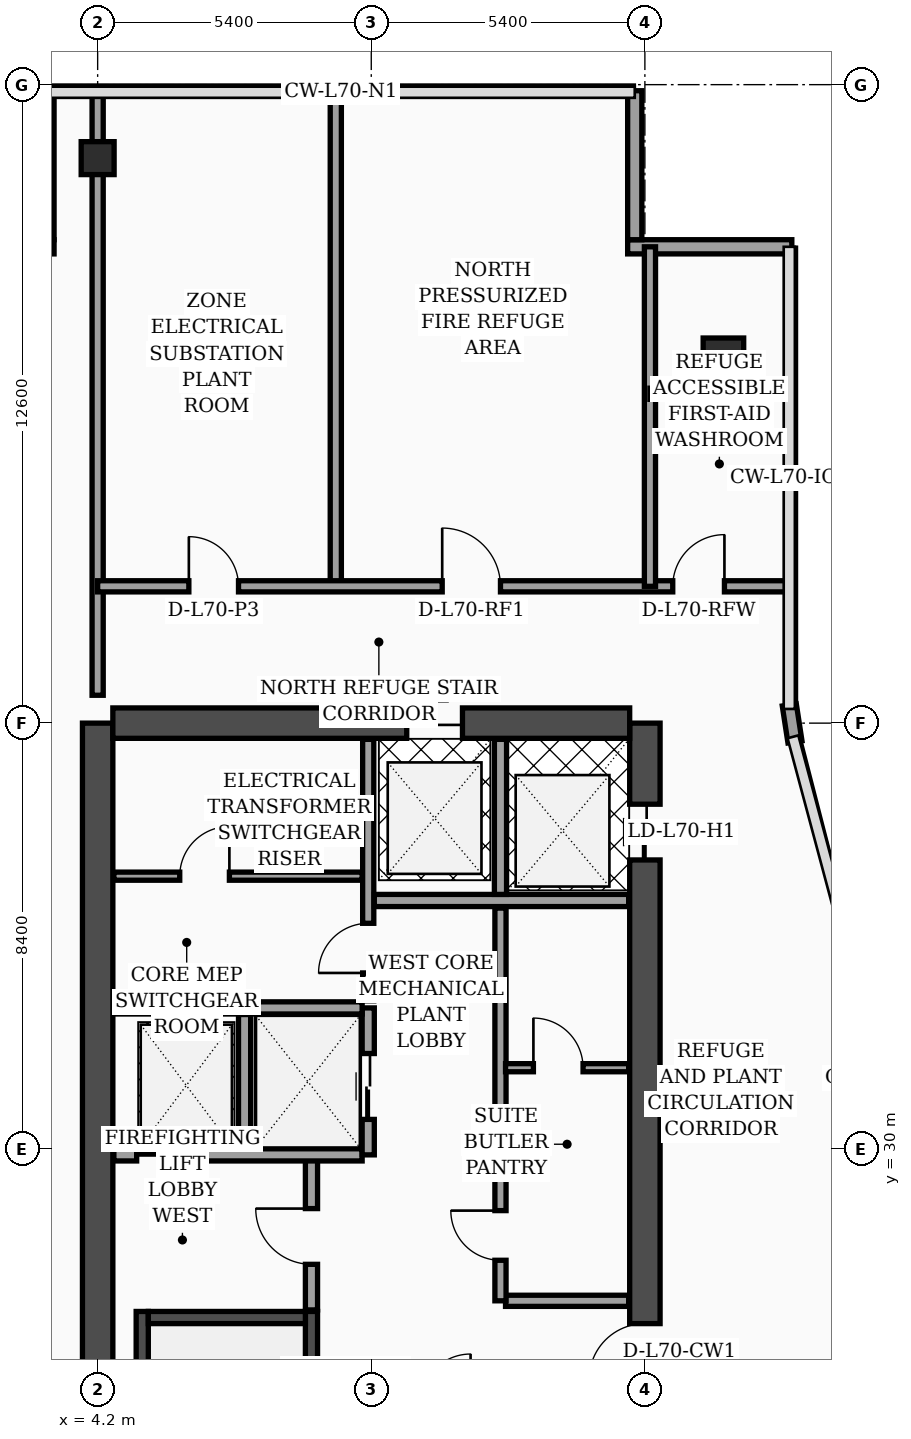
"""IFC4 building model, lengths in metres.
Left out: names, types, materials, properties, quantities, classifications, styles, units other than length and angle.
Written with IfcOpenShell. Run it as: python <this file> out.ifc"""

import sys

from ifc_helpers import new_model, si_unit, direction, frame, frame_2d, origin, origin_2d, place, context, subcontext, project, spatial, rectangle, hollow_rectangle, extrude, element, fill, save


model = new_model("IFC4")
c1 = context("Model", 3, precision=1e-05, world=origin(), true_north=direction((0.0, 1.0)))
c2 = subcontext(c1, "Body", "Model", "MODEL_VIEW")
j1 = project(units=[si_unit("LENGTHUNIT", "METRE"), si_unit("PLANEANGLEUNIT", "RADIAN")], contexts=[c1])
p1 = place(None, origin())
s1 = spatial("IfcSite", under=j1, at=p1, CompositionType="ELEMENT")
p2 = place(p1, origin())
s2 = spatial("IfcBuilding", under=s1, at=p2, CompositionType="ELEMENT")
p3 = place(p2, frame((0.0, 0.0, 282.5)))
s3 = spatial("IfcBuildingStorey", under=s2, at=p3, CompositionType="ELEMENT", Elevation=282.5)
p4 = place(p3, frame((4.2, 16.8, 0.0), z_axis=(0.0, 0.0, 1.0), x_axis=(0.0, 1.0, 0.0)))
e1 = element("IfcWall", 1, at=p4, inside=s3, PredefinedType="SHEAR", context=c2, shape_type="SweptSolid", body=[
    extrude(rectangle(XDim=21.6, YDim=0.6, at=frame_2d((10.8, 0.0))), origin(), (0.0, 0.0, 1.0), 4.35),
])
p5 = place(p3, frame((15.0, 16.8, 0.0), z_axis=(0.0, 0.0, 1.0), x_axis=(0.0, 1.0, 0.0)))
e2 = element("IfcWall", 2, at=p5, inside=s3, PredefinedType="SHEAR", context=c2, shape_type="SweptSolid", body=[
    extrude(rectangle(XDim=21.6, YDim=0.6, at=frame_2d((10.8, 0.0))), origin(), (0.0, 0.0, 1.0), 4.35),
])
p6 = place(p5, frame((8.65, 0.0, 0.0)))
e3 = element("IfcOpeningElement", 3, at=p6, cuts=e2, PredefinedType="OPENING", context=c2, shape_type="SweptSolid", body=[
    extrude(rectangle(XDim=1.1, YDim=2.2, at=frame_2d((0.55, 1.1))), frame((0.0, 0.31, 0.0), z_axis=(0.0, -1.0, 0.0), x_axis=(1.0, 0.0, 0.0)), (0.0, 0.0, 1.0), 0.62),
])
p7 = place(p5, frame((18.9, 0.0, 0.0)))
e4 = element("IfcOpeningElement", 4, at=p7, cuts=e2, PredefinedType="OPENING", context=c2, shape_type="SweptSolid", body=[
    extrude(rectangle(XDim=1.1, YDim=2.2, at=frame_2d((0.55, 1.1))), frame((0.0, 0.31, 0.0), z_axis=(0.0, -1.0, 0.0), x_axis=(1.0, 0.0, 0.0)), (0.0, 0.0, 1.0), 0.62),
])
p8 = place(p3, frame((4.5, 38.4, 0.0), z_axis=(0.0, 0.0, 1.0), x_axis=(1.0, 0.0, 0.0)))
e5 = element("IfcWall", 5, at=p8, inside=s3, PredefinedType="SHEAR", context=c2, shape_type="SweptSolid", body=[
    extrude(rectangle(XDim=10.2, YDim=0.6, at=frame_2d((5.1, 0.0))), origin(), (0.0, 0.0, 1.0), 4.35),
])
p9 = place(p8, frame((5.8, 0.0, 0.0)))
e6 = element("IfcOpeningElement", 6, at=p9, cuts=e5, PredefinedType="OPENING", context=c2, shape_type="SweptSolid", body=[
    extrude(rectangle(XDim=1.1, YDim=2.2, at=frame_2d((0.55, 1.1))), frame((0.0, 0.31, 0.0), z_axis=(0.0, -1.0, 0.0), x_axis=(1.0, 0.0, 0.0)), (0.0, 0.0, 1.0), 0.62),
])
p10 = place(p3, frame((5.08, 17.1, 0.0), z_axis=(0.0, 0.0, 1.0), x_axis=(0.0, 1.0, 0.0)))
e7 = element("IfcWall", 7, at=p10, inside=s3, PredefinedType="SOLIDWALL", context=c2, shape_type="SweptSolid", body=[
    extrude(rectangle(XDim=9.69, YDim=0.24, at=frame_2d((4.845, 0.0))), origin(), (0.0, 0.0, 1.0), 4.35),
])
p11 = place(p3, frame((8.42, 17.1, 0.0), z_axis=(0.0, 0.0, 1.0), x_axis=(0.0, 1.0, 0.0)))
e8 = element("IfcWall", 8, at=p11, inside=s3, PredefinedType="SOLIDWALL", context=c2, shape_type="SweptSolid", body=[
    extrude(rectangle(XDim=9.69, YDim=0.24, at=frame_2d((4.845, 0.0))), origin(), (0.0, 0.0, 1.0), 4.35),
])
p12 = place(p11, frame((0.35, 0.0, 0.0)))
e9 = element("IfcOpeningElement", 9, at=p12, cuts=e8, PredefinedType="OPENING", context=c2, shape_type="SweptSolid", body=[
    extrude(rectangle(XDim=1.15, YDim=2.2, at=frame_2d((0.575, 1.1))), frame((0.0, 0.13, 0.0), z_axis=(0.0, -1.0, 0.0), x_axis=(1.0, 0.0, 0.0)), (0.0, 0.0, 1.0), 0.26),
])
p13 = place(p3, frame((5.2, 26.67, 0.0), z_axis=(0.0, 0.0, 1.0), x_axis=(1.0, 0.0, 0.0)))
e10 = element("IfcWall", 10, at=p13, inside=s3, PredefinedType="SOLIDWALL", context=c2, shape_type="SweptSolid", body=[
    extrude(rectangle(XDim=3.1, YDim=0.24, at=frame_2d((1.55, 0.0))), origin(), (0.0, 0.0, 1.0), 4.35),
])
p14 = place(p3, frame((4.2, 49.55, 0.0), z_axis=(0.0, 0.0, 1.0), x_axis=(1.0, 0.0, 0.0)))
e11 = element("IfcColumn", 11, at=p14, inside=s3, PredefinedType="COLUMN", context=c2, shape_type="SweptSolid", body=[
    extrude(hollow_rectangle(XDim=0.65, YDim=0.65, WallThickness=0.028, at=origin_2d()), origin(), (0.0, 0.0, 1.0), 4.35),
])
p15 = place(p3, frame((16.55, 45.6, 0.0), z_axis=(0.0, 0.0, 1.0), x_axis=(1.0, 0.0, 0.0)))
e12 = element("IfcColumn", 12, at=p15, inside=s3, PredefinedType="COLUMN", context=c2, shape_type="SweptSolid", body=[
    extrude(rectangle(XDim=0.8, YDim=0.8, at=origin_2d()), origin(), (0.0, 0.0, 1.0), 4.35),
])
p16 = place(p3, frame((17.962, 38.03, 0.0), z_axis=(0.0, 0.0, 1.0), x_axis=(-0.15141125477, 0.988470855377, 0.0)))
e13 = element("IfcWall", 13, at=p16, inside=s3, PredefinedType="SOLIDWALL", context=c2, shape_type="SweptSolid", body=[
    extrude(rectangle(XDim=0.739, YDim=0.28, at=frame_2d((0.369, 0.0))), origin(), (0.0, 0.0, 1.0), 4.35),
])
p17 = place(p3, frame((17.9, 47.8, 0.0), z_axis=(0.0, 0.0, 1.0), x_axis=(-1.0, 0.0, 0.0)))
e14 = element("IfcWall", 14, at=p17, inside=s3, PredefinedType="SOLIDWALL", context=c2, shape_type="SweptSolid", body=[
    extrude(rectangle(XDim=3.24, YDim=0.28, at=frame_2d((1.62, 0.0))), origin(), (0.0, 0.0, 1.0), 4.35),
])
p18 = place(p3, frame((14.8, 47.94, 0.0), z_axis=(0.0, 0.0, 1.0), x_axis=(0.0, 1.0, 0.0)))
e15 = element("IfcWall", 15, at=p18, inside=s3, PredefinedType="SOLIDWALL", context=c2, shape_type="SweptSolid", body=[
    extrude(rectangle(XDim=2.94, YDim=0.28, at=frame_2d((1.47, 0.0))), origin(), (0.0, 0.0, 1.0), 4.35),
])
p19 = place(p3, frame((3.2, 50.88, 0.0), z_axis=(0.0, 0.0, 1.0), x_axis=(0.0, -1.0, 0.0)))
e16 = element("IfcWall", 16, at=p19, inside=s3, PredefinedType="SOLIDWALL", context=c2, shape_type="SweptSolid", body=[
    extrude(rectangle(XDim=2.94, YDim=0.28, at=frame_2d((1.47, 0.0))), origin(), (0.0, 0.0, 1.0), 3.9),
])
p20 = place(p3, frame((3.34, 47.8, 0.0), z_axis=(0.0, 0.0, 1.0), x_axis=(-1.0, 0.0, 0.0)))
e17 = element("IfcWall", 17, at=p20, inside=s3, PredefinedType="SOLIDWALL", context=c2, shape_type="SweptSolid", body=[
    extrude(rectangle(XDim=3.22, YDim=0.28, at=frame_2d((1.61, 0.0))), origin(), (0.0, 0.0, 1.0), 3.9),
])
p21 = place(p3, frame((8.42, 26.82, 0.0), z_axis=(0.0, 0.0, 1.0), x_axis=(0.0, 1.0, 0.0)))
e18 = element("IfcWall", 18, at=p21, inside=s3, PredefinedType="SOLIDWALL", context=c2, shape_type="SweptSolid", body=[
    extrude(rectangle(XDim=3.0, YDim=0.24, at=frame_2d((1.5, 0.0))), origin(), (0.0, 0.0, 1.0), 4.35),
])
p22 = place(p21, frame((0.9, 0.0, 0.0)))
e19 = element("IfcOpeningElement", 19, at=p22, cuts=e18, PredefinedType="OPENING", context=c2, shape_type="SweptSolid", body=[
    extrude(rectangle(XDim=1.1, YDim=2.2, at=frame_2d((0.55, 1.1))), frame((0.0, 0.13, 0.0), z_axis=(0.0, -1.0, 0.0), x_axis=(1.0, 0.0, 0.0)), (0.0, 0.0, 1.0), 0.26),
])
p23 = place(p3, frame((4.52, 29.88, 0.0), z_axis=(0.0, 0.0, 1.0), x_axis=(1.0, 0.0, 0.0)))
e20 = element("IfcWall", 20, at=p23, inside=s3, PredefinedType="SOLIDWALL", context=c2, shape_type="SweptSolid", body=[
    extrude(rectangle(XDim=4.9, YDim=0.24, at=frame_2d((2.45, 0.0))), origin(), (0.0, 0.0, 1.0), 4.35),
])
p24 = place(p23, frame((0.45, 0.0, 0.0)))
e21 = element("IfcOpeningElement", 21, at=p24, cuts=e20, PredefinedType="OPENING", context=c2, shape_type="SweptSolid", body=[
    extrude(rectangle(XDim=1.3, YDim=2.35, at=frame_2d((0.65, 1.175))), frame((0.0, 0.13, 0.0), z_axis=(0.0, -1.0, 0.0), x_axis=(1.0, 0.0, 0.0)), (0.0, 0.0, 1.0), 0.26),
])
p25 = place(p3, frame((7.1, 30.02, 0.0), z_axis=(0.0, 0.0, 1.0), x_axis=(0.0, 1.0, 0.0)))
e22 = element("IfcWall", 22, at=p25, inside=s3, PredefinedType="SOLIDWALL", context=c2, shape_type="SweptSolid", body=[
    extrude(rectangle(XDim=2.63, YDim=0.24, at=frame_2d((1.315, 0.0))), origin(), (0.0, 0.0, 1.0), 4.35),
])
p26 = place(p3, frame((9.54, 29.88, 0.0), z_axis=(0.0, 0.0, 1.0), x_axis=(0.0, 1.0, 0.0)))
e23 = element("IfcWall", 23, at=p26, inside=s3, PredefinedType="SOLIDWALL", context=c2, shape_type="SweptSolid", body=[
    extrude(rectangle(XDim=2.9, YDim=0.24, at=frame_2d((1.45, 0.0))), origin(), (0.0, 0.0, 1.0), 4.35),
])
p27 = place(p26, frame((0.7, 0.0, 0.0)))
e24 = element("IfcOpeningElement", 24, at=p27, cuts=e23, PredefinedType="OPENING", context=c2, shape_type="SweptSolid", body=[
    extrude(rectangle(XDim=1.3, YDim=2.35, at=frame_2d((0.65, 1.175))), frame((0.0, 0.13, 0.0), z_axis=(0.0, -1.0, 0.0), x_axis=(1.0, 0.0, 0.0)), (0.0, 0.0, 1.0), 0.26),
])
p28 = place(p3, frame((4.52, 32.78, 0.0), z_axis=(0.0, 0.0, 1.0), x_axis=(1.0, 0.0, 0.0)))
e25 = element("IfcWall", 25, at=p28, inside=s3, PredefinedType="SOLIDWALL", context=c2, shape_type="SweptSolid", body=[
    extrude(rectangle(XDim=4.9, YDim=0.24, at=frame_2d((2.45, 0.0))), origin(), (0.0, 0.0, 1.0), 4.0),
])
p29 = place(p3, frame((4.52, 35.38, 0.0), z_axis=(0.0, 0.0, 1.0), x_axis=(1.0, 0.0, 0.0)))
e26 = element("IfcWall", 26, at=p29, inside=s3, PredefinedType="PARTITIONING", context=c2, shape_type="SweptSolid", body=[
    extrude(rectangle(XDim=4.9, YDim=0.16, at=frame_2d((2.45, 0.0))), origin(), (0.0, 0.0, 1.0), 4.35),
])
p30 = place(p29, frame((1.3, 0.0, 0.0)))
e27 = element("IfcOpeningElement", 27, at=p30, cuts=e26, PredefinedType="OPENING", context=c2, shape_type="SweptSolid", body=[
    extrude(rectangle(XDim=0.98, YDim=2.15, at=frame_2d((0.49, 1.075))), frame((0.0, 0.09, 0.0), z_axis=(0.0, -1.0, 0.0), x_axis=(1.0, 0.0, 0.0)), (0.0, 0.0, 1.0), 0.18),
])
p31 = place(p3, frame((9.54, 32.92, 0.0), z_axis=(0.0, 0.0, 1.0), x_axis=(0.0, 1.0, 0.0)))
e28 = element("IfcWall", 28, at=p31, inside=s3, PredefinedType="SOLIDWALL", context=c2, shape_type="SweptSolid", body=[
    extrude(rectangle(XDim=5.16, YDim=0.22, at=frame_2d((2.58, 0.0))), origin(), (0.0, 0.0, 1.0), 4.35),
])
p32 = place(p31, frame((0.55, 0.0, 0.0)))
e29 = element("IfcOpeningElement", 29, at=p32, cuts=e28, PredefinedType="OPENING", context=c2, shape_type="SweptSolid", body=[
    extrude(rectangle(XDim=0.98, YDim=2.15, at=frame_2d((0.49, 1.075))), frame((0.0, 0.12, 0.0), z_axis=(0.0, -1.0, 0.0), x_axis=(1.0, 0.0, 0.0)), (0.0, 0.0, 1.0), 0.24),
])
p33 = place(p3, frame((12.25, 27.0, 0.0), z_axis=(0.0, 0.0, 1.0), x_axis=(1.0, 0.0, 0.0)))
e30 = element("IfcWall", 30, at=p33, inside=s3, PredefinedType="SOLIDWALL", context=c2, shape_type="SweptSolid", body=[
    extrude(rectangle(XDim=2.43, YDim=0.22, at=frame_2d((1.215, 0.0))), origin(), (0.0, 0.0, 1.0), 4.35),
])
p34 = place(p3, frame((12.15, 27.0, 0.0), z_axis=(0.0, 0.0, 1.0), x_axis=(0.0, 1.0, 0.0)))
e31 = element("IfcWall", 31, at=p34, inside=s3, PredefinedType="SOLIDWALL", context=c2, shape_type="SweptSolid", body=[
    extrude(rectangle(XDim=7.75, YDim=0.22, at=frame_2d((3.875, 0.0))), origin(), (0.0, 0.0, 1.0), 4.35),
])
p35 = place(p34, frame((0.8, 0.0, 0.0)))
e32 = element("IfcOpeningElement", 32, at=p35, cuts=e31, PredefinedType="OPENING", context=c2, shape_type="SweptSolid", body=[
    extrude(rectangle(XDim=0.98, YDim=2.15, at=frame_2d((0.49, 1.075))), frame((0.0, 0.12, 0.0), z_axis=(0.0, -1.0, 0.0), x_axis=(1.0, 0.0, 0.0)), (0.0, 0.0, 1.0), 0.24),
])
p36 = place(p3, frame((12.25, 31.6, 0.0), z_axis=(0.0, 0.0, 1.0), x_axis=(1.0, 0.0, 0.0)))
e33 = element("IfcWall", 33, at=p36, inside=s3, PredefinedType="PARTITIONING", context=c2, shape_type="SweptSolid", body=[
    extrude(rectangle(XDim=2.43, YDim=0.16, at=frame_2d((1.215, 0.0))), origin(), (0.0, 0.0, 1.0), 3.95),
])
p37 = place(p36, frame((0.55, 0.0, 0.0)))
e34 = element("IfcOpeningElement", 34, at=p37, cuts=e33, PredefinedType="OPENING", context=c2, shape_type="SweptSolid", body=[
    extrude(rectangle(XDim=0.98, YDim=2.15, at=frame_2d((0.49, 1.075))), frame((0.0, 0.09, 0.0), z_axis=(0.0, -1.0, 0.0), x_axis=(1.0, 0.0, 0.0)), (0.0, 0.0, 1.0), 0.18),
])
p38 = place(p3, frame((9.66, 34.9, 0.0), z_axis=(0.0, 0.0, 1.0), x_axis=(1.0, 0.0, 0.0)))
e35 = element("IfcWall", 35, at=p38, inside=s3, PredefinedType="SOLIDWALL", context=c2, shape_type="SweptSolid", body=[
    extrude(rectangle(XDim=5.02, YDim=0.24, at=frame_2d((2.51, 0.0))), origin(), (0.0, 0.0, 1.0), 4.35),
])
p39 = place(p3, frame((12.15, 35.02, 0.0), z_axis=(0.0, 0.0, 1.0), x_axis=(0.0, 1.0, 0.0)))
e36 = element("IfcWall", 36, at=p39, inside=s3, PredefinedType="SOLIDWALL", context=c2, shape_type="SweptSolid", body=[
    extrude(rectangle(XDim=3.06, YDim=0.24, at=frame_2d((1.53, 0.0))), origin(), (0.0, 0.0, 1.0), 4.35),
])
p40 = place(p3, frame((4.2, 38.95, 0.0), z_axis=(0.0, 0.0, 1.0), x_axis=(0.0, 1.0, 0.0)))
e37 = element("IfcWall", 37, at=p40, inside=s3, PredefinedType="SOLIDWALL", context=c2, shape_type="SweptSolid", body=[
    extrude(rectangle(XDim=11.99, YDim=0.22, at=frame_2d((5.995, 0.0))), origin(), (0.0, 0.0, 1.0), 3.8),
])
p41 = place(p3, frame((8.9, 41.1, 0.0), z_axis=(0.0, 0.0, 1.0), x_axis=(0.0, 1.0, 0.0)))
e38 = element("IfcWall", 38, at=p41, inside=s3, PredefinedType="SOLIDWALL", context=c2, shape_type="SweptSolid", body=[
    extrude(rectangle(XDim=9.84, YDim=0.22, at=frame_2d((4.92, 0.0))), origin(), (0.0, 0.0, 1.0), 3.9),
])
p42 = place(p3, frame((4.2, 41.1, 0.0), z_axis=(0.0, 0.0, 1.0), x_axis=(1.0, 0.0, 0.0)))
e39 = element("IfcWall", 39, at=p42, inside=s3, PredefinedType="SOLIDWALL", context=c2, shape_type="SweptSolid", body=[
    extrude(rectangle(XDim=13.65, YDim=0.22, at=frame_2d((6.825, 0.0))), origin(), (0.0, 0.0, 1.0), 3.8),
])
p43 = place(p42, frame((1.8, 0.0, 0.0)))
e40 = element("IfcOpeningElement", 40, at=p43, cuts=e39, PredefinedType="OPENING", context=c2, shape_type="SweptSolid", body=[
    extrude(rectangle(XDim=0.98, YDim=2.15, at=frame_2d((0.49, 1.075))), frame((0.0, 0.12, 0.0), z_axis=(0.0, -1.0, 0.0), x_axis=(1.0, 0.0, 0.0)), (0.0, 0.0, 1.0), 0.24),
])
p44 = place(p42, frame((6.8, 0.0, 0.0)))
e41 = element("IfcOpeningElement", 41, at=p44, cuts=e39, PredefinedType="OPENING", context=c2, shape_type="SweptSolid", body=[
    extrude(rectangle(XDim=1.15, YDim=2.2, at=frame_2d((0.575, 1.1))), frame((0.0, 0.12, 0.0), z_axis=(0.0, -1.0, 0.0), x_axis=(1.0, 0.0, 0.0)), (0.0, 0.0, 1.0), 0.24),
])
p45 = place(p42, frame((11.35, 0.0, 0.0)))
e42 = element("IfcOpeningElement", 42, at=p45, cuts=e39, PredefinedType="OPENING", context=c2, shape_type="SweptSolid", body=[
    extrude(rectangle(XDim=1.02, YDim=2.2, at=frame_2d((0.51, 1.1))), frame((0.0, 0.12, 0.0), z_axis=(0.0, -1.0, 0.0), x_axis=(1.0, 0.0, 0.0)), (0.0, 0.0, 1.0), 0.24),
])
p46 = place(p3, frame((15.1, 41.1, 0.0), z_axis=(0.0, 0.0, 1.0), x_axis=(0.0, 1.0, 0.0)))
e43 = element("IfcWall", 43, at=p46, inside=s3, PredefinedType="SOLIDWALL", context=c2, shape_type="SweptSolid", body=[
    extrude(rectangle(XDim=6.7, YDim=0.22, at=frame_2d((3.35, 0.0))), origin(), (0.0, 0.0, 1.0), 3.8),
])
p47 = place(p3, frame((15.1, 44.9, 0.0), z_axis=(0.0, 0.0, 1.0), x_axis=(1.0, 0.0, 0.0)))
e44 = element("IfcWall", 44, at=p47, inside=s3, PredefinedType="SOLIDWALL", context=c2, shape_type="SweptSolid", body=[
    extrude(rectangle(XDim=2.75, YDim=0.22, at=frame_2d((1.375, 0.0))), origin(), (0.0, 0.0, 1.0), 3.8),
])
p48 = place(p22, origin())
e45 = element("IfcDoor", 45, at=p48, inside=s3, OperationType="SINGLE_SWING_RIGHT", PredefinedType="DOOR", context=c2, shape_type="SweptSolid", body=[
    extrude(rectangle(XDim=1.1, YDim=2.2, at=frame_2d((0.55, 1.1))), frame((0.0, 0.025, 0.0), z_axis=(0.0, -1.0, 0.0), x_axis=(1.0, 0.0, 0.0)), (0.0, 0.0, 1.0), 0.05),
])
fill(e19, e45)
p49 = place(p24, origin())
e46 = element("IfcDoor", 46, at=p49, inside=s3, OperationType="DOUBLE_DOOR_SLIDING", PredefinedType="DOOR", context=c2, shape_type="SweptSolid", body=[
    extrude(rectangle(XDim=1.3, YDim=2.35, at=frame_2d((0.65, 1.175))), frame((0.0, 0.025, 0.0), z_axis=(0.0, -1.0, 0.0), x_axis=(1.0, 0.0, 0.0)), (0.0, 0.0, 1.0), 0.05),
])
fill(e21, e46)
p50 = place(p27, origin())
e47 = element("IfcDoor", 47, at=p50, inside=s3, OperationType="DOUBLE_DOOR_SLIDING", PredefinedType="DOOR", context=c2, shape_type="SweptSolid", body=[
    extrude(rectangle(XDim=1.3, YDim=2.35, at=frame_2d((0.65, 1.175))), frame((0.0, 0.025, 0.0), z_axis=(0.0, -1.0, 0.0), x_axis=(1.0, 0.0, 0.0)), (0.0, 0.0, 1.0), 0.05),
])
fill(e24, e47)
p51 = place(p30, origin())
e48 = element("IfcDoor", 48, at=p51, inside=s3, OperationType="SINGLE_SWING_RIGHT", PredefinedType="DOOR", context=c2, shape_type="SweptSolid", body=[
    extrude(rectangle(XDim=0.98, YDim=2.15, at=frame_2d((0.49, 1.075))), frame((0.0, 0.025, 0.0), z_axis=(0.0, -1.0, 0.0), x_axis=(1.0, 0.0, 0.0)), (0.0, 0.0, 1.0), 0.05),
])
fill(e27, e48)
p52 = place(p32, origin())
e49 = element("IfcDoor", 49, at=p52, inside=s3, OperationType="SINGLE_SWING_LEFT", PredefinedType="DOOR", context=c2, shape_type="SweptSolid", body=[
    extrude(rectangle(XDim=0.98, YDim=2.15, at=frame_2d((0.49, 1.075))), frame((0.0, 0.025, 0.0), z_axis=(0.0, -1.0, 0.0), x_axis=(1.0, 0.0, 0.0)), (0.0, 0.0, 1.0), 0.05),
])
fill(e29, e49)
p53 = place(p35, origin())
e50 = element("IfcDoor", 50, at=p53, inside=s3, OperationType="SINGLE_SWING_RIGHT", PredefinedType="DOOR", context=c2, shape_type="SweptSolid", body=[
    extrude(rectangle(XDim=0.98, YDim=2.15, at=frame_2d((0.49, 1.075))), frame((0.0, 0.025, 0.0), z_axis=(0.0, -1.0, 0.0), x_axis=(1.0, 0.0, 0.0)), (0.0, 0.0, 1.0), 0.05),
])
fill(e32, e50)
p54 = place(p37, origin())
e51 = element("IfcDoor", 51, at=p54, inside=s3, OperationType="SINGLE_SWING_LEFT", PredefinedType="DOOR", context=c2, shape_type="SweptSolid", body=[
    extrude(rectangle(XDim=0.98, YDim=2.15, at=frame_2d((0.49, 1.075))), frame((0.0, 0.025, 0.0), z_axis=(0.0, -1.0, 0.0), x_axis=(1.0, 0.0, 0.0)), (0.0, 0.0, 1.0), 0.05),
])
fill(e34, e51)
p55 = place(p43, origin())
e52 = element("IfcDoor", 52, at=p55, inside=s3, OperationType="SINGLE_SWING_LEFT", PredefinedType="DOOR", context=c2, shape_type="SweptSolid", body=[
    extrude(rectangle(XDim=0.98, YDim=2.15, at=frame_2d((0.49, 1.075))), frame((0.0, 0.025, 0.0), z_axis=(0.0, -1.0, 0.0), x_axis=(1.0, 0.0, 0.0)), (0.0, 0.0, 1.0), 0.05),
])
fill(e40, e52)
p56 = place(p44, origin())
e53 = element("IfcDoor", 53, at=p56, inside=s3, OperationType="SINGLE_SWING_LEFT", PredefinedType="DOOR", context=c2, shape_type="SweptSolid", body=[
    extrude(rectangle(XDim=1.15, YDim=2.2, at=frame_2d((0.575, 1.1))), frame((0.0, 0.025, 0.0), z_axis=(0.0, -1.0, 0.0), x_axis=(1.0, 0.0, 0.0)), (0.0, 0.0, 1.0), 0.05),
])
fill(e41, e53)
p57 = place(p45, origin())
e54 = element("IfcDoor", 54, at=p57, inside=s3, OperationType="SINGLE_SWING_RIGHT", PredefinedType="DOOR", context=c2, shape_type="SweptSolid", body=[
    extrude(rectangle(XDim=1.02, YDim=2.2, at=frame_2d((0.51, 1.1))), frame((0.0, 0.025, 0.0), z_axis=(0.0, -1.0, 0.0), x_axis=(1.0, 0.0, 0.0)), (0.0, 0.0, 1.0), 0.05),
])
fill(e42, e54)
p58 = place(p6, origin())
e55 = element("IfcDoor", 55, at=p58, inside=s3, OperationType="SINGLE_SWING_LEFT", PredefinedType="DOOR", context=c2, shape_type="SweptSolid", body=[
    extrude(rectangle(XDim=1.1, YDim=2.2, at=frame_2d((0.55, 1.1))), frame((0.0, 0.025, 0.0), z_axis=(0.0, -1.0, 0.0), x_axis=(1.0, 0.0, 0.0)), (0.0, 0.0, 1.0), 0.05),
])
fill(e3, e55)
p59 = place(p7, origin())
e56 = element("IfcDoor", 56, at=p59, inside=s3, OperationType="DOUBLE_DOOR_SLIDING", PredefinedType="DOOR", context=c2, shape_type="SweptSolid", body=[
    extrude(rectangle(XDim=1.1, YDim=2.2, at=frame_2d((0.55, 1.1))), frame((0.0, 0.025, 0.0), z_axis=(0.0, -1.0, 0.0), x_axis=(1.0, 0.0, 0.0)), (0.0, 0.0, 1.0), 0.05),
])
fill(e4, e56)
p60 = place(p9, origin())
e57 = element("IfcDoor", 57, at=p60, inside=s3, OperationType="DOUBLE_DOOR_SLIDING", PredefinedType="DOOR", context=c2, shape_type="SweptSolid", body=[
    extrude(rectangle(XDim=1.1, YDim=2.2, at=frame_2d((0.55, 1.1))), frame((0.0, 0.025, 0.0), z_axis=(0.0, -1.0, 0.0), x_axis=(1.0, 0.0, 0.0)), (0.0, 0.0, 1.0), 0.05),
])
fill(e6, e57)
save(model, sys.argv[1])
